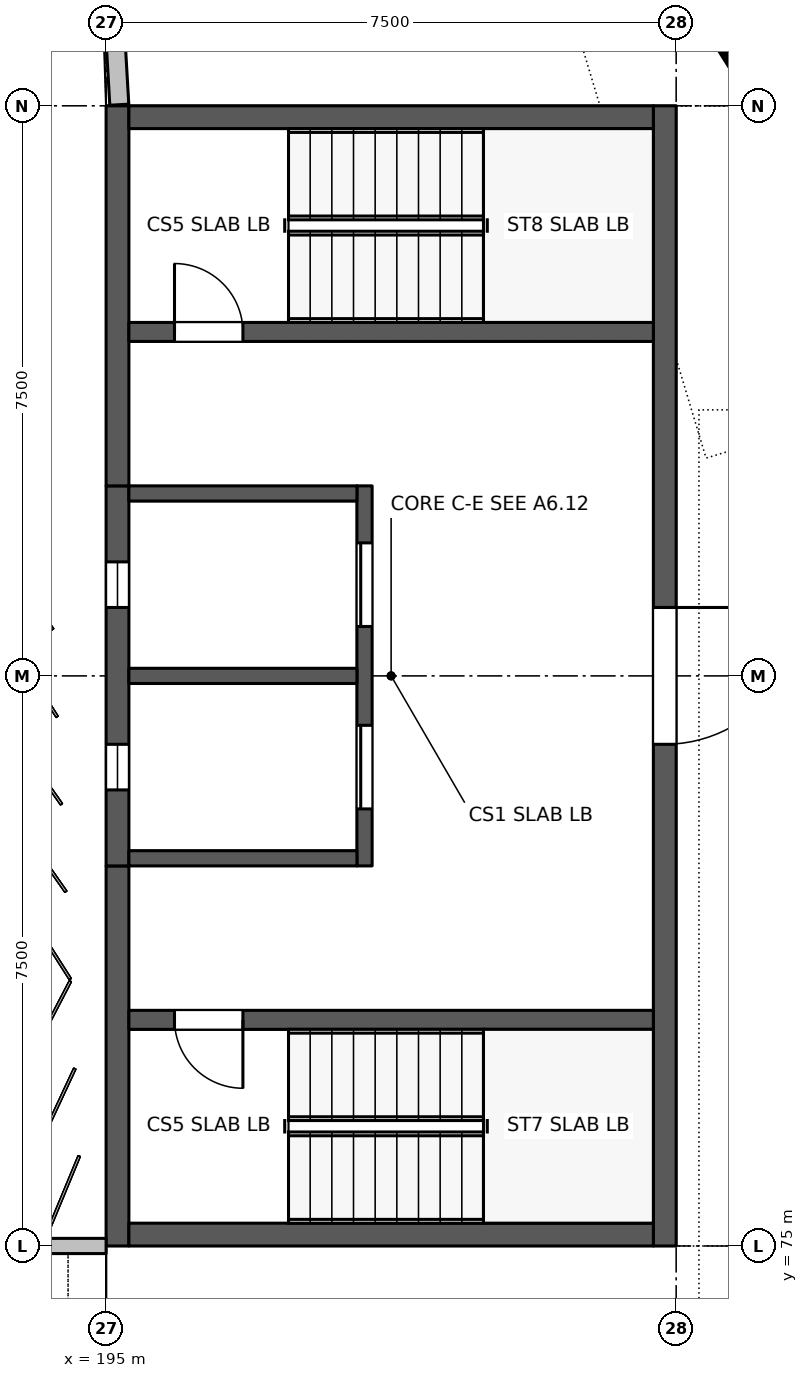
"""IFC4 building model, lengths in metres.
Left out: names, types, materials, properties, quantities, classifications, styles, units other than length and angle.
Written with IfcOpenShell. Run it as: python <this file> out.ifc"""

import sys

from ifc_helpers import new_model, si_unit, direction, frame, frame_2d, origin, place, context, subcontext, project, spatial, rectangle, extrude, element, fill, save


model = new_model("IFC4")
c1 = context("Model", 3, precision=1e-05, world=origin(), true_north=direction((0.0, 1.0)))
c2 = subcontext(c1, "Body", "Model", "MODEL_VIEW")
j1 = project(units=[si_unit("LENGTHUNIT", "METRE"), si_unit("PLANEANGLEUNIT", "RADIAN")], contexts=[c1])
p1 = place(None, origin())
s1 = spatial("IfcSite", under=j1, at=p1, CompositionType="ELEMENT")
p2 = place(p1, origin())
s2 = spatial("IfcBuilding", under=s1, at=p2, CompositionType="ELEMENT")
p3 = place(p2, frame((0.0, 0.0, 3.3)))
s3 = spatial("IfcBuildingStorey", under=s2, at=p3, CompositionType="ELEMENT", Elevation=3.3)
p4 = place(p3, frame((195.039, 92.356, 0.0), z_axis=(0.0, 0.0, 1.0), x_axis=(0.057263271658, -0.998359112604, 0.0)))
e1 = element("IfcWall", 1, at=p4, inside=s3, PredefinedType="SOLIDWALL", context=c2, shape_type="SweptSolid", body=[
    extrude(rectangle(XDim=2.345, YDim=0.25, at=frame_2d((1.172, 0.0))), origin(), (0.0, 0.0, 1.0), 1.1),
])
p5 = place(p3, frame((187.654, 75.0, 0.0), z_axis=(0.0, 0.0, 1.0), x_axis=(1.0, 0.0, 0.0)))
e2 = element("IfcWall", 2, at=p5, inside=s3, PredefinedType="SOLIDWALL", context=c2, shape_type="SweptSolid", body=[
    extrude(rectangle(XDim=7.346, YDim=0.2, at=frame_2d((3.673, 0.0))), origin(), (0.0, 0.0, 1.0), 2.627),
])
p6 = place(p5, frame((0.849, 0.0, 0.9)))
e3 = element("IfcOpeningElement", 3, at=p6, cuts=e2, PredefinedType="OPENING", context=c2, shape_type="SweptSolid", body=[
    extrude(rectangle(XDim=2.4, YDim=1.5, at=frame_2d((1.2, 0.75))), frame((0.0, 0.11, 0.0), z_axis=(0.0, -1.0, 0.0), x_axis=(1.0, 0.0, 0.0)), (0.0, 0.0, 1.0), 0.22),
])
p7 = place(p5, frame((4.098, 0.0, 0.9)))
e4 = element("IfcOpeningElement", 4, at=p7, cuts=e2, PredefinedType="OPENING", context=c2, shape_type="SweptSolid", body=[
    extrude(rectangle(XDim=2.4, YDim=1.5, at=frame_2d((1.2, 0.75))), frame((0.0, 0.11, 0.0), z_axis=(0.0, -1.0, 0.0), x_axis=(1.0, 0.0, 0.0)), (0.0, 0.0, 1.0), 0.22),
])
p8 = place(p3, frame((202.35, 90.0, 0.0), z_axis=(0.0, 0.0, 1.0), x_axis=(0.0, -1.0, 0.0)))
e5 = element("IfcWall", 5, at=p8, inside=s3, PredefinedType="SHEAR", context=c2, shape_type="SweptSolid", body=[
    extrude(rectangle(XDim=15.0, YDim=0.3, at=frame_2d((7.5, 0.0))), origin(), (0.0, 0.0, 1.0), 3.3),
])
p9 = place(p8, frame((6.6, 0.0, 0.0)))
e6 = element("IfcOpeningElement", 6, at=p9, cuts=e5, PredefinedType="OPENING", context=c2, shape_type="SweptSolid", body=[
    extrude(rectangle(XDim=1.8, YDim=2.1, at=frame_2d((0.9, 1.05))), frame((0.0, 0.16, 0.0), z_axis=(0.0, -1.0, 0.0), x_axis=(1.0, 0.0, 0.0)), (0.0, 0.0, 1.0), 0.32),
])
p10 = place(p3, frame((195.15, 75.0, 0.0), z_axis=(0.0, 0.0, 1.0), x_axis=(0.0, 1.0, 0.0)))
e7 = element("IfcWall", 7, at=p10, inside=s3, PredefinedType="SHEAR", context=c2, shape_type="SweptSolid", body=[
    extrude(rectangle(XDim=5.0, YDim=0.3, at=frame_2d((2.5, 0.0))), origin(), (0.0, 0.0, 1.0), 3.3),
])
p11 = place(p3, frame((195.15, 80.0, 0.0), z_axis=(0.0, 0.0, 1.0), x_axis=(0.0, 1.0, 0.0)))
e8 = element("IfcWall", 8, at=p11, inside=s3, PredefinedType="SHEAR", context=c2, shape_type="SweptSolid", body=[
    extrude(rectangle(XDim=5.0, YDim=0.3, at=frame_2d((2.5, 0.0))), origin(), (0.0, 0.0, 1.0), 3.3),
])
p12 = place(p11, frame((1.0, 0.0, 0.3)))
e9 = element("IfcOpeningElement", 9, at=p12, cuts=e8, PredefinedType="OPENING", context=c2, shape_type="SweptSolid", body=[
    extrude(rectangle(XDim=0.6, YDim=2.7, at=frame_2d((0.3, 1.35))), frame((0.0, 0.16, 0.0), z_axis=(0.0, -1.0, 0.0), x_axis=(1.0, 0.0, 0.0)), (0.0, 0.0, 1.0), 0.32),
])
p13 = place(p11, frame((3.4, 0.0, 0.3)))
e10 = element("IfcOpeningElement", 10, at=p13, cuts=e8, PredefinedType="OPENING", context=c2, shape_type="SweptSolid", body=[
    extrude(rectangle(XDim=0.6, YDim=2.7, at=frame_2d((0.3, 1.35))), frame((0.0, 0.16, 0.0), z_axis=(0.0, -1.0, 0.0), x_axis=(1.0, 0.0, 0.0)), (0.0, 0.0, 1.0), 0.32),
])
p14 = place(p3, frame((195.15, 85.0, 0.0), z_axis=(0.0, 0.0, 1.0), x_axis=(0.0, 1.0, 0.0)))
e11 = element("IfcWall", 11, at=p14, inside=s3, PredefinedType="SHEAR", context=c2, shape_type="SweptSolid", body=[
    extrude(rectangle(XDim=5.0, YDim=0.3, at=frame_2d((2.5, 0.0))), origin(), (0.0, 0.0, 1.0), 3.3),
])
for number, where, z_axis, x_axis in (
    (12, (202.2, 75.15, 0.0), (0.0, 0.0, 1.0), (-1.0, 0.0, 0.0)),
    (13, (202.2, 89.85, 0.0), (0.0, 0.0, 1.0), (-1.0, 0.0, 0.0)),
):
    element("IfcWall", number, at=place(p3, frame(where, z_axis=z_axis, x_axis=x_axis)), inside=s3, PredefinedType="SHEAR", context=c2, shape_type="SweptSolid", body=[
        extrude(rectangle(XDim=6.9, YDim=0.3, at=frame_2d((3.45, 0.0))), origin(), (0.0, 0.0, 1.0), 3.3),
    ])
p15 = place(p3, frame((202.2, 77.975, 0.0), z_axis=(0.0, 0.0, 1.0), x_axis=(-1.0, 0.0, 0.0)))
e14 = element("IfcWall", 14, at=p15, inside=s3, PredefinedType="STANDARD", context=c2, shape_type="SweptSolid", body=[
    extrude(rectangle(XDim=6.9, YDim=0.25, at=frame_2d((3.45, 0.0))), origin(), (0.0, 0.0, 1.0), 3.1),
])
p16 = place(p15, frame((5.4, 0.0, 0.0)))
e15 = element("IfcOpeningElement", 15, at=p16, cuts=e14, PredefinedType="OPENING", context=c2, shape_type="SweptSolid", body=[
    extrude(rectangle(XDim=0.9, YDim=2.1, at=frame_2d((0.45, 1.05))), frame((0.0, 0.135, 0.0), z_axis=(0.0, -1.0, 0.0), x_axis=(1.0, 0.0, 0.0)), (0.0, 0.0, 1.0), 0.27),
])
p17 = place(p3, frame((195.3, 87.025, 0.0), z_axis=(0.0, 0.0, 1.0), x_axis=(1.0, 0.0, 0.0)))
e16 = element("IfcWall", 16, at=p17, inside=s3, PredefinedType="STANDARD", context=c2, shape_type="SweptSolid", body=[
    extrude(rectangle(XDim=6.9, YDim=0.25, at=frame_2d((3.45, 0.0))), origin(), (0.0, 0.0, 1.0), 3.1),
])
p18 = place(p17, frame((0.6, 0.0, 0.0)))
e17 = element("IfcOpeningElement", 17, at=p18, cuts=e16, PredefinedType="OPENING", context=c2, shape_type="SweptSolid", body=[
    extrude(rectangle(XDim=0.9, YDim=2.1, at=frame_2d((0.45, 1.05))), frame((0.0, 0.135, 0.0), z_axis=(0.0, -1.0, 0.0), x_axis=(1.0, 0.0, 0.0)), (0.0, 0.0, 1.0), 0.27),
])
p19 = place(p3, frame((198.4, 80.0, 0.0), z_axis=(0.0, 0.0, 1.0), x_axis=(0.0, 1.0, 0.0)))
e18 = element("IfcWall", 18, at=p19, inside=s3, PredefinedType="STANDARD", context=c2, shape_type="SweptSolid", body=[
    extrude(rectangle(XDim=5.0, YDim=0.2, at=frame_2d((2.5, 0.0))), origin(), (0.0, 0.0, 1.0), 3.1),
])
p20 = place(p19, frame((0.75, 0.0, 0.0)))
e19 = element("IfcOpeningElement", 19, at=p20, cuts=e18, PredefinedType="OPENING", context=c2, shape_type="SweptSolid", body=[
    extrude(rectangle(XDim=1.1, YDim=2.1, at=frame_2d((0.55, 1.05))), frame((0.0, 0.11, 0.0), z_axis=(0.0, -1.0, 0.0), x_axis=(1.0, 0.0, 0.0)), (0.0, 0.0, 1.0), 0.22),
])
p21 = place(p19, frame((3.15, 0.0, 0.0)))
e20 = element("IfcOpeningElement", 20, at=p21, cuts=e18, PredefinedType="OPENING", context=c2, shape_type="SweptSolid", body=[
    extrude(rectangle(XDim=1.1, YDim=2.1, at=frame_2d((0.55, 1.05))), frame((0.0, 0.11, 0.0), z_axis=(0.0, -1.0, 0.0), x_axis=(1.0, 0.0, 0.0)), (0.0, 0.0, 1.0), 0.22),
])
for number, where, z_axis, x_axis in (
    (21, (198.3, 80.1, 0.0), (0.0, 0.0, 1.0), (-1.0, 0.0, 0.0)),
    (22, (198.3, 82.5, 0.0), (0.0, 0.0, 1.0), (-1.0, 0.0, 0.0)),
    (23, (198.3, 84.9, 0.0), (0.0, 0.0, 1.0), (-1.0, 0.0, 0.0)),
):
    element("IfcWall", number, at=place(p3, frame(where, z_axis=z_axis, x_axis=x_axis)), inside=s3, PredefinedType="STANDARD", context=c2, shape_type="SweptSolid", body=[
        extrude(rectangle(XDim=3.0, YDim=0.2, at=frame_2d((1.5, 0.0))), origin(), (0.0, 0.0, 1.0), 3.1),
    ])
p22 = place(p9, origin())
e24 = element("IfcDoor", 24, at=p22, inside=s3, OperationType="DOUBLE_DOOR_SINGLE_SWING", PredefinedType="DOOR", context=c2, shape_type="SweptSolid", body=[
    extrude(rectangle(XDim=1.8, YDim=2.1, at=frame_2d((0.9, 1.05))), frame((0.0, 0.025, 0.0), z_axis=(0.0, -1.0, 0.0), x_axis=(1.0, 0.0, 0.0)), (0.0, 0.0, 1.0), 0.05),
])
fill(e6, e24)
p23 = place(p16, origin())
e25 = element("IfcDoor", 25, at=p23, inside=s3, OperationType="SINGLE_SWING_LEFT", PredefinedType="DOOR", context=c2, shape_type="SweptSolid", body=[
    extrude(rectangle(XDim=0.9, YDim=2.1, at=frame_2d((0.45, 1.05))), frame((0.0, 0.025, 0.0), z_axis=(0.0, -1.0, 0.0), x_axis=(1.0, 0.0, 0.0)), (0.0, 0.0, 1.0), 0.05),
])
fill(e15, e25)
p24 = place(p18, origin())
e26 = element("IfcDoor", 26, at=p24, inside=s3, OperationType="SINGLE_SWING_RIGHT", PredefinedType="DOOR", context=c2, shape_type="SweptSolid", body=[
    extrude(rectangle(XDim=0.9, YDim=2.1, at=frame_2d((0.45, 1.05))), frame((0.0, 0.025, 0.0), z_axis=(0.0, -1.0, 0.0), x_axis=(1.0, 0.0, 0.0)), (0.0, 0.0, 1.0), 0.05),
])
fill(e17, e26)
p25 = place(p20, origin())
e27 = element("IfcDoor", 27, at=p25, inside=s3, OperationType="DOUBLE_DOOR_SLIDING", PredefinedType="DOOR", context=c2, shape_type="SweptSolid", body=[
    extrude(rectangle(XDim=1.1, YDim=2.1, at=frame_2d((0.55, 1.05))), frame((0.0, 0.025, 0.0), z_axis=(0.0, -1.0, 0.0), x_axis=(1.0, 0.0, 0.0)), (0.0, 0.0, 1.0), 0.05),
])
fill(e19, e27)
p26 = place(p21, origin())
e28 = element("IfcDoor", 28, at=p26, inside=s3, OperationType="DOUBLE_DOOR_SLIDING", PredefinedType="DOOR", context=c2, shape_type="SweptSolid", body=[
    extrude(rectangle(XDim=1.1, YDim=2.1, at=frame_2d((0.55, 1.05))), frame((0.0, 0.025, 0.0), z_axis=(0.0, -1.0, 0.0), x_axis=(1.0, 0.0, 0.0)), (0.0, 0.0, 1.0), 0.05),
])
fill(e20, e28)
p27 = place(p12, origin())
e29 = element("IfcWindow", 29, at=p27, inside=s3, PartitioningType="SINGLE_PANEL", PredefinedType="WINDOW", context=c2, shape_type="SweptSolid", body=[
    extrude(rectangle(XDim=0.6, YDim=2.7, at=frame_2d((0.3, 1.35))), frame((0.0, 0.03, 0.0), z_axis=(0.0, -1.0, 0.0), x_axis=(1.0, 0.0, 0.0)), (0.0, 0.0, 1.0), 0.06),
])
fill(e9, e29)
p28 = place(p13, origin())
e30 = element("IfcWindow", 30, at=p28, inside=s3, PartitioningType="SINGLE_PANEL", PredefinedType="WINDOW", context=c2, shape_type="SweptSolid", body=[
    extrude(rectangle(XDim=0.6, YDim=2.7, at=frame_2d((0.3, 1.35))), frame((0.0, 0.03, 0.0), z_axis=(0.0, -1.0, 0.0), x_axis=(1.0, 0.0, 0.0)), (0.0, 0.0, 1.0), 0.06),
])
fill(e10, e30)
save(model, sys.argv[1])
